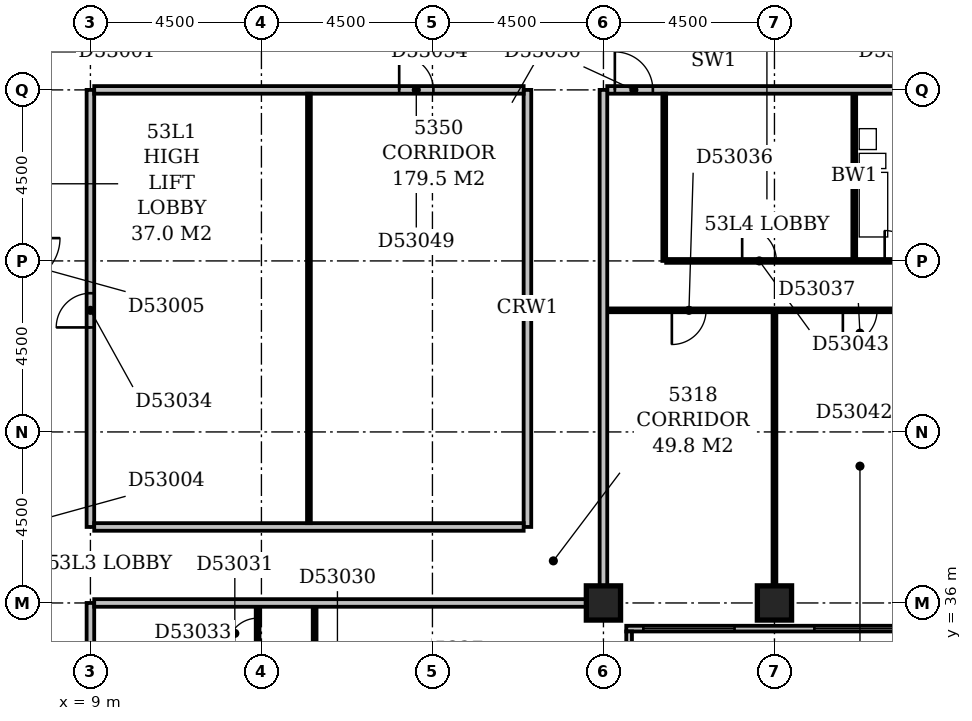
"""IFC4 building model, lengths in metres.
Left out: names, types, materials, properties, quantities, classifications, styles, units other than length and angle.
Written with IfcOpenShell. Run it as: python <this file> out.ifc"""

import sys

from ifc_helpers import new_model, si_unit, direction, frame, frame_2d, origin, origin_2d, place, context, subcontext, project, spatial, rectangle, extrude, element, fill, save


model = new_model("IFC4")
c1 = context("Model", 3, precision=1e-05, world=origin(), true_north=direction((0.0, 1.0)))
c2 = subcontext(c1, "Body", "Model", "MODEL_VIEW")
j1 = project(units=[si_unit("LENGTHUNIT", "METRE"), si_unit("PLANEANGLEUNIT", "RADIAN")], contexts=[c1])
p1 = place(None, origin())
s1 = spatial("IfcSite", under=j1, at=p1, CompositionType="ELEMENT")
p2 = place(p1, origin())
s2 = spatial("IfcBuilding", under=s1, at=p2, CompositionType="ELEMENT")
p3 = place(p2, frame((0.0, 0.0, 207.8)))
s3 = spatial("IfcBuildingStorey", under=s2, at=p3, CompositionType="ELEMENT", Elevation=207.8)
for number, where, z_axis, x_axis in (
    (1, (22.5, 36.0, -0.3), (0.0, 0.0, 1.0), (1.0, 0.0, 0.0)),
    (2, (27.0, 36.0, -0.3), (0.0, 0.0, 1.0), (1.0, 0.0, 0.0)),
):
    element("IfcColumn", number, at=place(p3, frame(where, z_axis=z_axis, x_axis=x_axis)), inside=s3, PredefinedType="COLUMN", context=c2, shape_type="SweptSolid", body=[
        extrude(rectangle(XDim=0.9, YDim=0.9, at=origin_2d()), origin(), (0.0, 0.0, 1.0), 3.55),
    ])
p4 = place(p3, frame((23.175, 17.4, 0.0), z_axis=(0.0, 0.0, 1.0), x_axis=(0.0, 1.0, 0.0)))
e3 = element("IfcWall", 3, at=p4, inside=s3, PredefinedType="STANDARD", context=c2, shape_type="SweptSolid", body=[
    extrude(rectangle(XDim=17.85, YDim=0.15, at=frame_2d((8.925, 0.0))), origin(), (0.0, 0.0, 1.0), 2.7),
])
p5 = place(p4, frame((1.65, 0.0, 0.6)))
e4 = element("IfcOpeningElement", 4, at=p5, cuts=e3, PredefinedType="OPENING", context=c2, shape_type="SweptSolid", body=[
    extrude(rectangle(XDim=2.4, YDim=1.8, at=frame_2d((1.2, 0.9))), frame((0.0, 0.087, 0.0), z_axis=(0.0, -1.0, 0.0), x_axis=(1.0, 0.0, 0.0)), (0.0, 0.0, 1.0), 0.174),
])
p6 = place(p4, frame((6.15, 0.0, 0.6)))
e5 = element("IfcOpeningElement", 5, at=p6, cuts=e3, PredefinedType="OPENING", context=c2, shape_type="SweptSolid", body=[
    extrude(rectangle(XDim=2.4, YDim=1.8, at=frame_2d((1.2, 0.9))), frame((0.0, 0.087, 0.0), z_axis=(0.0, -1.0, 0.0), x_axis=(1.0, 0.0, 0.0)), (0.0, 0.0, 1.0), 0.174),
])
p7 = place(p4, frame((10.65, 0.0, 0.6)))
e6 = element("IfcOpeningElement", 6, at=p7, cuts=e3, PredefinedType="OPENING", context=c2, shape_type="SweptSolid", body=[
    extrude(rectangle(XDim=2.4, YDim=1.8, at=frame_2d((1.2, 0.9))), frame((0.0, 0.087, 0.0), z_axis=(0.0, -1.0, 0.0), x_axis=(1.0, 0.0, 0.0)), (0.0, 0.0, 1.0), 0.174),
])
p8 = place(p4, frame((14.787, 0.0, 0.6)))
e7 = element("IfcOpeningElement", 7, at=p8, cuts=e3, PredefinedType="OPENING", context=c2, shape_type="SweptSolid", body=[
    extrude(rectangle(XDim=0.9, YDim=1.8, at=frame_2d((0.45, 0.9))), frame((0.0, 0.087, 0.0), z_axis=(0.0, -1.0, 0.0), x_axis=(1.0, 0.0, 0.0)), (0.0, 0.0, 1.0), 0.174),
])
p9 = place(p3, frame((23.1, 35.325, 0.0), z_axis=(0.0, 0.0, 1.0), x_axis=(1.0, 0.0, 0.0)))
e8 = element("IfcWall", 8, at=p9, inside=s3, PredefinedType="STANDARD", context=c2, shape_type="SweptSolid", body=[
    extrude(rectangle(XDim=27.15, YDim=0.15, at=frame_2d((13.575, 0.0))), origin(), (0.0, 0.0, 1.0), 2.7),
])
p10 = place(p9, frame((0.45, 0.0, 0.6)))
e9 = element("IfcOpeningElement", 9, at=p10, cuts=e8, PredefinedType="OPENING", context=c2, shape_type="SweptSolid", body=[
    extrude(rectangle(XDim=2.4, YDim=1.8, at=frame_2d((1.2, 0.9))), frame((0.0, 0.087, 0.0), z_axis=(0.0, -1.0, 0.0), x_axis=(1.0, 0.0, 0.0)), (0.0, 0.0, 1.0), 0.174),
])
p11 = place(p9, frame((4.95, 0.0, 0.6)))
e10 = element("IfcOpeningElement", 10, at=p11, cuts=e8, PredefinedType="OPENING", context=c2, shape_type="SweptSolid", body=[
    extrude(rectangle(XDim=2.4, YDim=1.8, at=frame_2d((1.2, 0.9))), frame((0.0, 0.087, 0.0), z_axis=(0.0, -1.0, 0.0), x_axis=(1.0, 0.0, 0.0)), (0.0, 0.0, 1.0), 0.174),
])
p12 = place(p9, frame((9.189, 0.0, 0.6)))
e11 = element("IfcOpeningElement", 11, at=p12, cuts=e8, PredefinedType="OPENING", context=c2, shape_type="SweptSolid", body=[
    extrude(rectangle(XDim=2.1, YDim=1.8, at=frame_2d((1.05, 0.9))), frame((0.0, 0.087, 0.0), z_axis=(0.0, -1.0, 0.0), x_axis=(1.0, 0.0, 0.0)), (0.0, 0.0, 1.0), 0.174),
])
p13 = place(p9, frame((14.558, 0.0, 0.6)))
e12 = element("IfcOpeningElement", 12, at=p13, cuts=e8, PredefinedType="OPENING", context=c2, shape_type="SweptSolid", body=[
    extrude(rectangle(XDim=2.1, YDim=1.8, at=frame_2d((1.05, 0.9))), frame((0.0, 0.087, 0.0), z_axis=(0.0, -1.0, 0.0), x_axis=(1.0, 0.0, 0.0)), (0.0, 0.0, 1.0), 0.174),
])
p14 = place(p9, frame((18.45, 0.0, 0.6)))
e13 = element("IfcOpeningElement", 13, at=p14, cuts=e8, PredefinedType="OPENING", context=c2, shape_type="SweptSolid", body=[
    extrude(rectangle(XDim=2.4, YDim=1.8, at=frame_2d((1.2, 0.9))), frame((0.0, 0.087, 0.0), z_axis=(0.0, -1.0, 0.0), x_axis=(1.0, 0.0, 0.0)), (0.0, 0.0, 1.0), 0.174),
])
p15 = place(p9, frame((22.95, 0.0, 0.6)))
e14 = element("IfcOpeningElement", 14, at=p15, cuts=e8, PredefinedType="OPENING", context=c2, shape_type="SweptSolid", body=[
    extrude(rectangle(XDim=2.4, YDim=1.8, at=frame_2d((1.2, 0.9))), frame((0.0, 0.087, 0.0), z_axis=(0.0, -1.0, 0.0), x_axis=(1.0, 0.0, 0.0)), (0.0, 0.0, 1.0), 0.174),
])
p16 = place(p3, frame((9.0, 5.0, 0.0), z_axis=(0.0, 0.0, 1.0), x_axis=(0.0, 1.0, 0.0)))
e15 = element("IfcWall", 15, at=p16, inside=s3, PredefinedType="PARTITIONING", context=c2, shape_type="SweptSolid", body=[
    extrude(rectangle(XDim=31.0, YDim=0.2, at=frame_2d((15.5, 0.0))), origin(), (0.0, 0.0, 1.0), 3.25),
])
p17 = place(p16, frame((17.8, 0.0, 0.0)))
e16 = element("IfcOpeningElement", 16, at=p17, cuts=e15, PredefinedType="OPENING", context=c2, shape_type="SweptSolid", body=[
    extrude(rectangle(XDim=1.0, YDim=2.1, at=frame_2d((0.5, 1.05))), frame((0.0, 0.112, 0.0), z_axis=(0.0, -1.0, 0.0), x_axis=(1.0, 0.0, 0.0)), (0.0, 0.0, 1.0), 0.224),
])
p18 = place(p16, frame((14.95, 0.0, 0.0)))
e17 = element("IfcOpeningElement", 17, at=p18, cuts=e15, PredefinedType="OPENING", context=c2, shape_type="SweptSolid", body=[
    extrude(rectangle(XDim=1.0, YDim=2.1, at=frame_2d((0.5, 1.05))), frame((0.0, 0.112, 0.0), z_axis=(0.0, -1.0, 0.0), x_axis=(1.0, 0.0, 0.0)), (0.0, 0.0, 1.0), 0.224),
])
p19 = place(p16, frame((9.3, 0.0, 0.0)))
e18 = element("IfcOpeningElement", 18, at=p19, cuts=e15, PredefinedType="OPENING", context=c2, shape_type="SweptSolid", body=[
    extrude(rectangle(XDim=1.0, YDim=2.1, at=frame_2d((0.5, 1.05))), frame((0.0, 0.112, 0.0), z_axis=(0.0, -1.0, 0.0), x_axis=(1.0, 0.0, 0.0)), (0.0, 0.0, 1.0), 0.224),
])
p20 = place(p16, frame((1.5, 0.0, 0.0)))
e19 = element("IfcOpeningElement", 19, at=p20, cuts=e15, PredefinedType="OPENING", context=c2, shape_type="SweptSolid", body=[
    extrude(rectangle(XDim=0.9, YDim=2.1, at=frame_2d((0.45, 1.05))), frame((0.0, 0.112, 0.0), z_axis=(0.0, -1.0, 0.0), x_axis=(1.0, 0.0, 0.0)), (0.0, 0.0, 1.0), 0.224),
])
p21 = place(p3, frame((14.9, 22.6, 0.0), z_axis=(0.0, 0.0, 1.0), x_axis=(0.0, 1.0, 0.0)))
e20 = element("IfcWall", 20, at=p21, inside=s3, PredefinedType="PARTITIONING", context=c2, shape_type="SweptSolid", body=[
    extrude(rectangle(XDim=13.3, YDim=0.1, at=frame_2d((6.65, 0.0))), origin(), (0.0, 0.0, 1.0), 3.25),
])
p22 = place(p21, frame((1.7, 0.0, 0.0)))
e21 = element("IfcOpeningElement", 21, at=p22, cuts=e20, PredefinedType="OPENING", context=c2, shape_type="SweptSolid", body=[
    extrude(rectangle(XDim=0.9, YDim=2.1, at=frame_2d((0.45, 1.05))), frame((0.0, 0.062, 0.0), z_axis=(0.0, -1.0, 0.0), x_axis=(1.0, 0.0, 0.0)), (0.0, 0.0, 1.0), 0.124),
])
p23 = place(p21, frame((6.2, 0.0, 0.0)))
e22 = element("IfcOpeningElement", 22, at=p23, cuts=e20, PredefinedType="OPENING", context=c2, shape_type="SweptSolid", body=[
    extrude(rectangle(XDim=0.9, YDim=2.1, at=frame_2d((0.45, 1.05))), frame((0.0, 0.062, 0.0), z_axis=(0.0, -1.0, 0.0), x_axis=(1.0, 0.0, 0.0)), (0.0, 0.0, 1.0), 0.124),
])
p24 = place(p21, frame((10.7, 0.0, 0.0)))
e23 = element("IfcOpeningElement", 23, at=p24, cuts=e20, PredefinedType="OPENING", context=c2, shape_type="SweptSolid", body=[
    extrude(rectangle(XDim=0.9, YDim=2.1, at=frame_2d((0.45, 1.05))), frame((0.0, 0.062, 0.0), z_axis=(0.0, -1.0, 0.0), x_axis=(1.0, 0.0, 0.0)), (0.0, 0.0, 1.0), 0.124),
])
p25 = place(p3, frame((13.4, 24.1, 0.0), z_axis=(0.0, 0.0, 1.0), x_axis=(0.0, 1.0, 0.0)))
e24 = element("IfcWall", 24, at=p25, inside=s3, PredefinedType="PARTITIONING", context=c2, shape_type="SweptSolid", body=[
    extrude(rectangle(XDim=11.8, YDim=0.1, at=frame_2d((5.9, 0.0))), origin(), (0.0, 0.0, 1.0), 3.25),
])
p26 = place(p25, frame((8.7, 0.0, 0.0)))
e25 = element("IfcOpeningElement", 25, at=p26, cuts=e24, PredefinedType="OPENING", context=c2, shape_type="SweptSolid", body=[
    extrude(rectangle(XDim=0.8, YDim=2.1, at=frame_2d((0.4, 1.05))), frame((0.0, 0.062, 0.0), z_axis=(0.0, -1.0, 0.0), x_axis=(1.0, 0.0, 0.0)), (0.0, 0.0, 1.0), 0.124),
])
p27 = place(p25, frame((3.5, 0.0, 0.0)))
e26 = element("IfcOpeningElement", 26, at=p27, cuts=e24, PredefinedType="OPENING", context=c2, shape_type="SweptSolid", body=[
    extrude(rectangle(XDim=0.9, YDim=2.1, at=frame_2d((0.45, 1.05))), frame((0.0, 0.062, 0.0), z_axis=(0.0, -1.0, 0.0), x_axis=(1.0, 0.0, 0.0)), (0.0, 0.0, 1.0), 0.124),
])
p28 = place(p25, frame((10.7, 0.0, 0.0)))
e27 = element("IfcOpeningElement", 27, at=p28, cuts=e24, PredefinedType="OPENING", context=c2, shape_type="SweptSolid", body=[
    extrude(rectangle(XDim=0.8, YDim=2.1, at=frame_2d((0.4, 1.05))), frame((0.0, 0.062, 0.0), z_axis=(0.0, -1.0, 0.0), x_axis=(1.0, 0.0, 0.0)), (0.0, 0.0, 1.0), 0.124),
])
p29 = place(p3, frame((9.1, 36.0, 0.0), z_axis=(0.0, 0.0, 1.0), x_axis=(1.0, 0.0, 0.0)))
e28 = element("IfcWall", 28, at=p29, inside=s3, PredefinedType="PARTITIONING", context=c2, shape_type="SweptSolid", body=[
    extrude(rectangle(XDim=12.95, YDim=0.2, at=frame_2d((6.475, 0.0))), origin(), (0.0, 0.0, 1.0), 3.25),
])
p30 = place(p3, frame((22.5, 36.45, 0.0), z_axis=(0.0, 0.0, 1.0), x_axis=(0.0, 1.0, 0.0)))
e29 = element("IfcWall", 29, at=p30, inside=s3, PredefinedType="PARTITIONING", context=c2, shape_type="SweptSolid", body=[
    extrude(rectangle(XDim=13.05, YDim=0.2, at=frame_2d((6.525, 0.0))), origin(), (0.0, 0.0, 1.0), 3.25),
])
p31 = place(p3, frame((27.0, 36.45, 0.0), z_axis=(0.0, 0.0, 1.0), x_axis=(0.0, 1.0, 0.0)))
e30 = element("IfcWall", 30, at=p31, inside=s3, PredefinedType="PARTITIONING", context=c2, shape_type="SweptSolid", body=[
    extrude(rectangle(XDim=7.2, YDim=0.1, at=frame_2d((3.6, 0.0))), origin(), (0.0, 0.0, 1.0), 2.35),
])
p32 = place(p3, frame((9.0, 38.0, 0.0), z_axis=(0.0, 0.0, 1.0), x_axis=(0.0, 1.0, 0.0)))
e31 = element("IfcWall", 31, at=p32, inside=s3, PredefinedType="PARTITIONING", context=c2, shape_type="SweptSolid", body=[
    extrude(rectangle(XDim=11.5, YDim=0.2, at=frame_2d((5.75, 0.0))), origin(), (0.0, 0.0, 1.0), 3.25),
])
p33 = place(p32, frame((5.25, 0.0, 0.0)))
e32 = element("IfcOpeningElement", 32, at=p33, cuts=e31, PredefinedType="OPENING", context=c2, shape_type="SweptSolid", body=[
    extrude(rectangle(XDim=0.9, YDim=2.1, at=frame_2d((0.45, 1.05))), frame((0.0, 0.112, 0.0), z_axis=(0.0, -1.0, 0.0), x_axis=(1.0, 0.0, 0.0)), (0.0, 0.0, 1.0), 0.224),
])
p34 = place(p3, frame((9.1, 38.0, 0.0), z_axis=(0.0, 0.0, 1.0), x_axis=(1.0, 0.0, 0.0)))
e33 = element("IfcWall", 33, at=p34, inside=s3, PredefinedType="PARTITIONING", context=c2, shape_type="SweptSolid", body=[
    extrude(rectangle(XDim=11.3, YDim=0.2, at=frame_2d((5.65, 0.0))), origin(), (0.0, 0.0, 1.0), 3.25),
])
p35 = place(p3, frame((20.5, 38.0, 0.0), z_axis=(0.0, 0.0, 1.0), x_axis=(0.0, 1.0, 0.0)))
e34 = element("IfcWall", 34, at=p35, inside=s3, PredefinedType="PARTITIONING", context=c2, shape_type="SweptSolid", body=[
    extrude(rectangle(XDim=11.5, YDim=0.2, at=frame_2d((5.75, 0.0))), origin(), (0.0, 0.0, 1.0), 3.25),
])
p36 = place(p3, frame((14.75, 38.1, 0.0), z_axis=(0.0, 0.0, 1.0), x_axis=(0.0, 1.0, 0.0)))
e35 = element("IfcWall", 35, at=p36, inside=s3, PredefinedType="PARTITIONING", context=c2, shape_type="SweptSolid", body=[
    extrude(rectangle(XDim=11.3, YDim=0.1, at=frame_2d((5.65, 0.0))), origin(), (0.0, 0.0, 1.0), 3.25),
])
p37 = place(p3, frame((22.6, 43.7, 0.0), z_axis=(0.0, 0.0, 1.0), x_axis=(1.0, 0.0, 0.0)))
e36 = element("IfcWall", 36, at=p37, inside=s3, PredefinedType="PARTITIONING", context=c2, shape_type="SweptSolid", body=[
    extrude(rectangle(XDim=8.8, YDim=0.1, at=frame_2d((4.4, 0.0))), origin(), (0.0, 0.0, 1.0), 3.25),
])
p38 = place(p37, frame((1.7, 0.0, 0.0)))
e37 = element("IfcOpeningElement", 37, at=p38, cuts=e36, PredefinedType="OPENING", context=c2, shape_type="SweptSolid", body=[
    extrude(rectangle(XDim=0.9, YDim=2.1, at=frame_2d((0.45, 1.05))), frame((0.0, 0.062, 0.0), z_axis=(0.0, -1.0, 0.0), x_axis=(1.0, 0.0, 0.0)), (0.0, 0.0, 1.0), 0.124),
])
p39 = place(p37, frame((6.2, 0.0, 0.0)))
e38 = element("IfcOpeningElement", 38, at=p39, cuts=e36, PredefinedType="OPENING", context=c2, shape_type="SweptSolid", body=[
    extrude(rectangle(XDim=0.9, YDim=2.1, at=frame_2d((0.45, 1.05))), frame((0.0, 0.062, 0.0), z_axis=(0.0, -1.0, 0.0), x_axis=(1.0, 0.0, 0.0)), (0.0, 0.0, 1.0), 0.124),
])
p40 = place(p3, frame((24.1, 45.0, 0.0), z_axis=(0.0, 0.0, 1.0), x_axis=(0.0, 1.0, 0.0)))
e39 = element("IfcWall", 39, at=p40, inside=s3, PredefinedType="PARTITIONING", context=c2, shape_type="SweptSolid", body=[
    extrude(rectangle(XDim=4.4, YDim=0.1, at=frame_2d((2.2, 0.0))), origin(), (0.0, 0.0, 1.0), 3.25),
])
p41 = place(p3, frame((24.15, 45.0, 0.0), z_axis=(0.0, 0.0, 1.0), x_axis=(1.0, 0.0, 0.0)))
e40 = element("IfcWall", 40, at=p41, inside=s3, PredefinedType="PARTITIONING", context=c2, shape_type="SweptSolid", body=[
    extrude(rectangle(XDim=7.25, YDim=0.1, at=frame_2d((3.625, 0.0))), origin(), (0.0, 0.0, 1.0), 3.25),
])
p42 = place(p41, frame((5.75, 0.0, 0.0)))
e41 = element("IfcOpeningElement", 41, at=p42, cuts=e40, PredefinedType="OPENING", context=c2, shape_type="SweptSolid", body=[
    extrude(rectangle(XDim=0.8, YDim=2.1, at=frame_2d((0.4, 1.05))), frame((0.0, 0.062, 0.0), z_axis=(0.0, -1.0, 0.0), x_axis=(1.0, 0.0, 0.0)), (0.0, 0.0, 1.0), 0.124),
])
p43 = place(p41, frame((2.0, 0.0, 0.0)))
e42 = element("IfcOpeningElement", 42, at=p43, cuts=e40, PredefinedType="OPENING", context=c2, shape_type="SweptSolid", body=[
    extrude(rectangle(XDim=0.9, YDim=2.1, at=frame_2d((0.45, 1.05))), frame((0.0, 0.062, 0.0), z_axis=(0.0, -1.0, 0.0), x_axis=(1.0, 0.0, 0.0)), (0.0, 0.0, 1.0), 0.124),
])
p44 = place(p3, frame((29.1, 45.05, 0.0), z_axis=(0.0, 0.0, 1.0), x_axis=(0.0, 1.0, 0.0)))
e43 = element("IfcWall", 43, at=p44, inside=s3, PredefinedType="PLUMBINGWALL", context=c2, shape_type="SweptSolid", body=[
    extrude(rectangle(XDim=4.35, YDim=0.1, at=frame_2d((2.175, 0.0))), origin(), (0.0, 0.0, 1.0), 3.25),
])
p45 = place(p3, frame((9.1, 49.5, 0.0), z_axis=(0.0, 0.0, 1.0), x_axis=(1.0, 0.0, 0.0)))
e44 = element("IfcWall", 44, at=p45, inside=s3, PredefinedType="PARTITIONING", context=c2, shape_type="SweptSolid", body=[
    extrude(rectangle(XDim=11.3, YDim=0.2, at=frame_2d((5.65, 0.0))), origin(), (0.0, 0.0, 1.0), 3.25),
])
p46 = place(p45, frame((8.025, 0.0, 0.0)))
e45 = element("IfcOpeningElement", 45, at=p46, cuts=e44, PredefinedType="OPENING", context=c2, shape_type="SweptSolid", body=[
    extrude(rectangle(XDim=0.9, YDim=2.1, at=frame_2d((0.45, 1.05))), frame((0.0, 0.112, 0.0), z_axis=(0.0, -1.0, 0.0), x_axis=(1.0, 0.0, 0.0)), (0.0, 0.0, 1.0), 0.224),
])
p47 = place(p3, frame((22.6, 49.5, 0.0), z_axis=(0.0, 0.0, 1.0), x_axis=(1.0, 0.0, 0.0)))
e46 = element("IfcWall", 46, at=p47, inside=s3, PredefinedType="PARTITIONING", context=c2, shape_type="SweptSolid", body=[
    extrude(rectangle(XDim=30.95, YDim=0.2, at=frame_2d((15.475, 0.0))), origin(), (0.0, 0.0, 1.0), 3.25),
])
p48 = place(p47, frame((0.2, 0.0, 0.0)))
e47 = element("IfcOpeningElement", 47, at=p48, cuts=e46, PredefinedType="OPENING", context=c2, shape_type="SweptSolid", body=[
    extrude(rectangle(XDim=1.0, YDim=2.1, at=frame_2d((0.5, 1.05))), frame((0.0, 0.112, 0.0), z_axis=(0.0, -1.0, 0.0), x_axis=(1.0, 0.0, 0.0)), (0.0, 0.0, 1.0), 0.224),
])
p49 = place(p47, frame((9.2, 0.0, 0.0)))
e48 = element("IfcOpeningElement", 48, at=p49, cuts=e46, PredefinedType="OPENING", context=c2, shape_type="SweptSolid", body=[
    extrude(rectangle(XDim=1.0, YDim=2.1, at=frame_2d((0.5, 1.05))), frame((0.0, 0.112, 0.0), z_axis=(0.0, -1.0, 0.0), x_axis=(1.0, 0.0, 0.0)), (0.0, 0.0, 1.0), 0.224),
])
p50 = place(p47, frame((22.7, 0.0, 0.0)))
e49 = element("IfcOpeningElement", 49, at=p50, cuts=e46, PredefinedType="OPENING", context=c2, shape_type="SweptSolid", body=[
    extrude(rectangle(XDim=1.0, YDim=2.1, at=frame_2d((0.5, 1.05))), frame((0.0, 0.112, 0.0), z_axis=(0.0, -1.0, 0.0), x_axis=(1.0, 0.0, 0.0)), (0.0, 0.0, 1.0), 0.224),
])
p51 = place(p10, origin())
e50 = element("IfcWindow", 50, at=p51, inside=s3, PartitioningType="SINGLE_PANEL", PredefinedType="WINDOW", context=c2, shape_type="SweptSolid", body=[
    extrude(rectangle(XDim=2.4, YDim=1.8, at=frame_2d((1.2, 0.9))), frame((0.0, 0.03, 0.0), z_axis=(0.0, -1.0, 0.0), x_axis=(1.0, 0.0, 0.0)), (0.0, 0.0, 1.0), 0.06),
])
fill(e9, e50)
p52 = place(p11, origin())
e51 = element("IfcWindow", 51, at=p52, inside=s3, PartitioningType="SINGLE_PANEL", PredefinedType="WINDOW", context=c2, shape_type="SweptSolid", body=[
    extrude(rectangle(XDim=2.4, YDim=1.8, at=frame_2d((1.2, 0.9))), frame((0.0, 0.03, 0.0), z_axis=(0.0, -1.0, 0.0), x_axis=(1.0, 0.0, 0.0)), (0.0, 0.0, 1.0), 0.06),
])
fill(e10, e51)
p53 = place(p28, origin())
e52 = element("IfcDoor", 52, at=p53, inside=s3, OperationType="SINGLE_SWING_LEFT", PredefinedType="DOOR", context=c2, shape_type="SweptSolid", body=[
    extrude(rectangle(XDim=0.8, YDim=2.1, at=frame_2d((0.4, 1.05))), frame((0.0, 0.025, 0.0), z_axis=(0.0, -1.0, 0.0), x_axis=(1.0, 0.0, 0.0)), (0.0, 0.0, 1.0), 0.05),
])
fill(e27, e52)
p54 = place(p33, origin())
e53 = element("IfcDoor", 53, at=p54, inside=s3, OperationType="SINGLE_SWING_LEFT", PredefinedType="DOOR", context=c2, shape_type="SweptSolid", body=[
    extrude(rectangle(XDim=0.9, YDim=2.1, at=frame_2d((0.45, 1.05))), frame((0.0, 0.025, 0.0), z_axis=(0.0, -1.0, 0.0), x_axis=(1.0, 0.0, 0.0)), (0.0, 0.0, 1.0), 0.05),
])
fill(e32, e53)
p55 = place(p38, frame((0.9, 0.0, 0.0), z_axis=(0.0, 0.0, 1.0), x_axis=(-1.0, 0.0, 0.0)))
e54 = element("IfcDoor", 54, at=p55, inside=s3, OperationType="SINGLE_SWING_RIGHT", PredefinedType="DOOR", context=c2, shape_type="SweptSolid", body=[
    extrude(rectangle(XDim=0.9, YDim=2.1, at=frame_2d((0.45, 1.05))), frame((0.0, 0.025, 0.0), z_axis=(0.0, -1.0, 0.0), x_axis=(1.0, 0.0, 0.0)), (0.0, 0.0, 1.0), 0.05),
])
fill(e37, e54)
p56 = place(p39, frame((0.9, 0.0, 0.0), z_axis=(0.0, 0.0, 1.0), x_axis=(-1.0, 0.0, 0.0)))
e55 = element("IfcDoor", 55, at=p56, inside=s3, OperationType="SINGLE_SWING_RIGHT", PredefinedType="DOOR", context=c2, shape_type="SweptSolid", body=[
    extrude(rectangle(XDim=0.9, YDim=2.1, at=frame_2d((0.45, 1.05))), frame((0.0, 0.025, 0.0), z_axis=(0.0, -1.0, 0.0), x_axis=(1.0, 0.0, 0.0)), (0.0, 0.0, 1.0), 0.05),
])
fill(e38, e55)
p57 = place(p42, origin())
e56 = element("IfcDoor", 56, at=p57, inside=s3, OperationType="SINGLE_SWING_LEFT", PredefinedType="DOOR", context=c2, shape_type="SweptSolid", body=[
    extrude(rectangle(XDim=0.8, YDim=2.1, at=frame_2d((0.4, 1.05))), frame((0.0, 0.025, 0.0), z_axis=(0.0, -1.0, 0.0), x_axis=(1.0, 0.0, 0.0)), (0.0, 0.0, 1.0), 0.05),
])
fill(e41, e56)
p58 = place(p43, origin())
e57 = element("IfcDoor", 57, at=p58, inside=s3, OperationType="SINGLE_SWING_LEFT", PredefinedType="DOOR", context=c2, shape_type="SweptSolid", body=[
    extrude(rectangle(XDim=0.9, YDim=2.1, at=frame_2d((0.45, 1.05))), frame((0.0, 0.025, 0.0), z_axis=(0.0, -1.0, 0.0), x_axis=(1.0, 0.0, 0.0)), (0.0, 0.0, 1.0), 0.05),
])
fill(e42, e57)
p59 = place(p46, origin())
e58 = element("IfcDoor", 58, at=p59, inside=s3, OperationType="SINGLE_SWING_LEFT", PredefinedType="DOOR", context=c2, shape_type="SweptSolid", body=[
    extrude(rectangle(XDim=0.9, YDim=2.1, at=frame_2d((0.45, 1.05))), frame((0.0, 0.025, 0.0), z_axis=(0.0, -1.0, 0.0), x_axis=(1.0, 0.0, 0.0)), (0.0, 0.0, 1.0), 0.05),
])
fill(e45, e58)
p60 = place(p48, origin())
e59 = element("IfcDoor", 59, at=p60, inside=s3, OperationType="SINGLE_SWING_LEFT", PredefinedType="DOOR", context=c2, shape_type="SweptSolid", body=[
    extrude(rectangle(XDim=1.0, YDim=2.1, at=frame_2d((0.5, 1.05))), frame((0.0, 0.025, 0.0), z_axis=(0.0, -1.0, 0.0), x_axis=(1.0, 0.0, 0.0)), (0.0, 0.0, 1.0), 0.05),
])
fill(e47, e59)
save(model, sys.argv[1])
